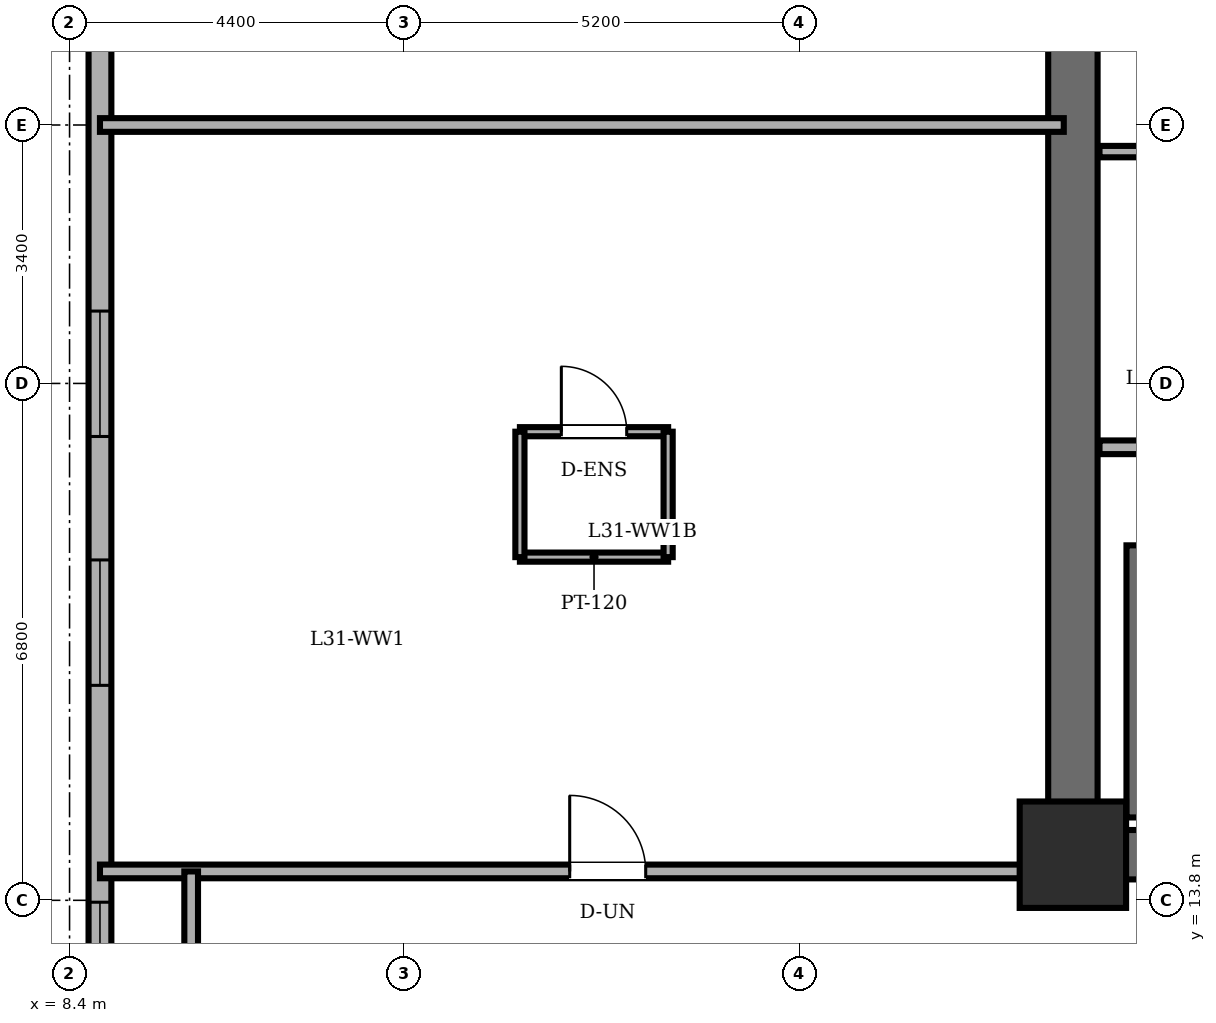
"""IFC4 building model, lengths in metres.
Left out: names, types, materials, properties, quantities, classifications, styles, units other than length and angle.
Written with IfcOpenShell. Run it as: python <this file> out.ifc"""

import sys

from ifc_helpers import new_model, si_unit, direction, frame, frame_2d, origin, origin_2d, place, context, subcontext, project, spatial, rectangle, extrude, element, fill, save


model = new_model("IFC4")
c1 = context("Model", 3, precision=1e-05, world=origin(), true_north=direction((0.0, 1.0)))
c2 = subcontext(c1, "Body", "Model", "MODEL_VIEW")
j1 = project(units=[si_unit("LENGTHUNIT", "METRE"), si_unit("PLANEANGLEUNIT", "RADIAN")], contexts=[c1])
p1 = place(None, origin())
s1 = spatial("IfcSite", under=j1, at=p1, CompositionType="ELEMENT")
p2 = place(p1, origin())
s2 = spatial("IfcBuilding", under=s1, at=p2, CompositionType="ELEMENT")
p3 = place(p2, frame((0.0, 0.0, 118.7)))
s3 = spatial("IfcBuildingStorey", under=s2, at=p3, CompositionType="ELEMENT", Elevation=118.7)
p4 = place(p3, frame((21.6, 14.4, 0.0), z_axis=(0.0, 0.0, 1.0), x_axis=(1.0, 0.0, 0.0)))
e1 = element("IfcColumn", 1, at=p4, inside=s3, PredefinedType="COLUMN", context=c2, shape_type="SweptSolid", body=[
    extrude(rectangle(XDim=1.4, YDim=1.4, at=origin_2d()), origin(), (0.0, 0.0, 1.0), 3.6),
])
p5 = place(p3, frame((8.8, 38.2, 0.0), z_axis=(0.0, 0.0, 1.0), x_axis=(0.0, -1.0, 0.0)))
e2 = element("IfcWall", 2, at=p5, inside=s3, PredefinedType="SOLIDWALL", context=c2, shape_type="SweptSolid", body=[
    extrude(rectangle(XDim=28.4, YDim=0.3, at=frame_2d((14.2, 0.0))), origin(), (0.0, 0.0, 1.0), 3.4),
])
p6 = place(p5, frame((2.325, 0.0, 0.85)))
e3 = element("IfcOpeningElement", 3, at=p6, cuts=e2, PredefinedType="OPENING", context=c2, shape_type="SweptSolid", body=[
    extrude(rectangle(XDim=1.65, YDim=1.55, at=frame_2d((0.825, 0.775))), frame((0.0, 0.16, 0.0), z_axis=(0.0, -1.0, 0.0), x_axis=(1.0, 0.0, 0.0)), (0.0, 0.0, 1.0), 0.32),
])
p7 = place(p5, frame((6.828, 0.0, 0.85)))
e4 = element("IfcOpeningElement", 4, at=p7, cuts=e2, PredefinedType="OPENING", context=c2, shape_type="SweptSolid", body=[
    extrude(rectangle(XDim=1.65, YDim=1.55, at=frame_2d((0.825, 0.775))), frame((0.0, 0.16, 0.0), z_axis=(0.0, -1.0, 0.0), x_axis=(1.0, 0.0, 0.0)), (0.0, 0.0, 1.0), 0.32),
])
p8 = place(p5, frame((10.102, 0.0, 0.85)))
e5 = element("IfcOpeningElement", 5, at=p8, cuts=e2, PredefinedType="OPENING", context=c2, shape_type="SweptSolid", body=[
    extrude(rectangle(XDim=1.65, YDim=1.55, at=frame_2d((0.825, 0.775))), frame((0.0, 0.16, 0.0), z_axis=(0.0, -1.0, 0.0), x_axis=(1.0, 0.0, 0.0)), (0.0, 0.0, 1.0), 0.32),
])
p9 = place(p5, frame((16.648, 0.0, 0.85)))
e6 = element("IfcOpeningElement", 6, at=p9, cuts=e2, PredefinedType="OPENING", context=c2, shape_type="SweptSolid", body=[
    extrude(rectangle(XDim=1.65, YDim=1.55, at=frame_2d((0.825, 0.775))), frame((0.0, 0.16, 0.0), z_axis=(0.0, -1.0, 0.0), x_axis=(1.0, 0.0, 0.0)), (0.0, 0.0, 1.0), 0.32),
])
p10 = place(p5, frame((19.922, 0.0, 0.85)))
e7 = element("IfcOpeningElement", 7, at=p10, cuts=e2, PredefinedType="OPENING", context=c2, shape_type="SweptSolid", body=[
    extrude(rectangle(XDim=1.65, YDim=1.55, at=frame_2d((0.825, 0.775))), frame((0.0, 0.16, 0.0), z_axis=(0.0, -1.0, 0.0), x_axis=(1.0, 0.0, 0.0)), (0.0, 0.0, 1.0), 0.32),
])
p11 = place(p5, frame((24.425, 0.0, 0.85)))
e8 = element("IfcOpeningElement", 8, at=p11, cuts=e2, PredefinedType="OPENING", context=c2, shape_type="SweptSolid", body=[
    extrude(rectangle(XDim=1.65, YDim=1.55, at=frame_2d((0.825, 0.775))), frame((0.0, 0.16, 0.0), z_axis=(0.0, -1.0, 0.0), x_axis=(1.0, 0.0, 0.0)), (0.0, 0.0, 1.0), 0.32),
])
p12 = place(p3, frame((21.6, 14.4, 0.0), z_axis=(0.0, 0.0, 1.0), x_axis=(0.0, 1.0, 0.0)))
e9 = element("IfcWall", 9, at=p12, inside=s3, PredefinedType="SHEAR", context=c2, shape_type="SweptSolid", body=[
    extrude(rectangle(XDim=19.2, YDim=0.65, at=frame_2d((9.6, 0.0))), origin(), (0.0, 0.0, 1.0), 3.4),
])
p13 = place(p3, frame((37.2, 14.4, 0.0), z_axis=(0.0, 0.0, 1.0), x_axis=(-1.0, 0.0, 0.0)))
e10 = element("IfcWall", 10, at=p13, inside=s3, PredefinedType="SHEAR", context=c2, shape_type="SweptSolid", body=[
    extrude(rectangle(XDim=15.6, YDim=0.65, at=frame_2d((7.8, 0.0))), origin(), (0.0, 0.0, 1.0), 3.4),
])
p14 = place(p3, frame((22.48, 14.89, 0.0), z_axis=(0.0, 0.0, 1.0), x_axis=(0.0, 1.0, 0.0)))
e11 = element("IfcWall", 11, at=p14, inside=s3, PredefinedType="SOLIDWALL", context=c2, shape_type="SweptSolid", body=[
    extrude(rectangle(XDim=3.58, YDim=0.35, at=frame_2d((1.79, 0.0))), origin(), (0.0, 0.0, 1.0), 3.4),
])
p15 = place(p3, frame((21.95, 19.76, 0.0), z_axis=(0.0, 0.0, 1.0), x_axis=(1.0, 0.0, 0.0)))
e12 = element("IfcWall", 12, at=p15, inside=s3, PredefinedType="PARTITIONING", context=c2, shape_type="SweptSolid", body=[
    extrude(rectangle(XDim=14.87, YDim=0.18, at=frame_2d((7.435, 0.0))), origin(), (0.0, 0.0, 1.0), 3.4),
])
p16 = place(p3, frame((21.95, 23.65, 0.0), z_axis=(0.0, 0.0, 1.0), x_axis=(1.0, 0.0, 0.0)))
e13 = element("IfcWall", 13, at=p16, inside=s3, PredefinedType="PARTITIONING", context=c2, shape_type="SweptSolid", body=[
    extrude(rectangle(XDim=2.51, YDim=0.15, at=frame_2d((1.255, 0.0))), origin(), (0.0, 0.0, 1.0), 3.4),
])
p17 = place(p3, frame((14.325, 19.965, 0.0), z_axis=(0.0, 0.0, 1.0), x_axis=(1.0, 0.0, 0.0)))
e14 = element("IfcWall", 14, at=p17, inside=s3, PredefinedType="PARTITIONING", context=c2, shape_type="SweptSolid", body=[
    extrude(rectangle(XDim=1.95, YDim=0.12, at=frame_2d((0.975, 0.0))), origin(), (0.0, 0.0, 1.0), 3.4),
])
p18 = place(p17, frame((0.545, 0.0, 0.0)))
e15 = element("IfcOpeningElement", 15, at=p18, cuts=e14, PredefinedType="OPENING", context=c2, shape_type="SweptSolid", body=[
    extrude(rectangle(XDim=0.86, YDim=2.1, at=frame_2d((0.43, 1.05))), frame((0.0, 0.07, 0.0), z_axis=(0.0, -1.0, 0.0), x_axis=(1.0, 0.0, 0.0)), (0.0, 0.0, 1.0), 0.14),
])
p19 = place(p3, frame((16.275, 18.315, 0.0), z_axis=(0.0, 0.0, 1.0), x_axis=(-1.0, 0.0, 0.0)))
e16 = element("IfcWall", 16, at=p19, inside=s3, PredefinedType="PARTITIONING", context=c2, shape_type="SweptSolid", body=[
    extrude(rectangle(XDim=1.95, YDim=0.12, at=frame_2d((0.975, 0.0))), origin(), (0.0, 0.0, 1.0), 3.4),
])
for number, where, z_axis, x_axis in (
    (17, (14.325, 19.965, 0.0), (0.0, 0.0, 1.0), (0.0, -1.0, 0.0)),
    (18, (16.275, 18.315, 0.0), (0.0, 0.0, 1.0), (0.0, 1.0, 0.0)),
):
    element("IfcWall", number, at=place(p3, frame(where, z_axis=z_axis, x_axis=x_axis)), inside=s3, PredefinedType="PARTITIONING", context=c2, shape_type="SweptSolid", body=[
        extrude(rectangle(XDim=1.65, YDim=0.12, at=frame_2d((0.825, 0.0))), origin(), (0.0, 0.0, 1.0), 3.4),
    ])
p20 = place(p3, frame((8.8, 14.18, 0.0), z_axis=(0.0, 0.0, 1.0), x_axis=(1.0, 0.0, 0.0)))
e19 = element("IfcWall", 19, at=p20, inside=s3, PredefinedType="PARTITIONING", context=c2, shape_type="SweptSolid", body=[
    extrude(rectangle(XDim=12.68, YDim=0.18, at=frame_2d((6.34, 0.0))), origin(), (0.0, 0.0, 1.0), 3.4),
])
p21 = place(p20, frame((6.18, 0.0, 0.0)))
e20 = element("IfcOpeningElement", 20, at=p21, cuts=e19, PredefinedType="OPENING", context=c2, shape_type="SweptSolid", body=[
    extrude(rectangle(XDim=1.0, YDim=2.15, at=frame_2d((0.5, 1.075))), frame((0.0, 0.1, 0.0), z_axis=(0.0, -1.0, 0.0), x_axis=(1.0, 0.0, 0.0)), (0.0, 0.0, 1.0), 0.2),
])
p22 = place(p3, frame((8.8, 24.0, 0.0), z_axis=(0.0, 0.0, 1.0), x_axis=(1.0, 0.0, 0.0)))
e21 = element("IfcWall", 21, at=p22, inside=s3, PredefinedType="PARTITIONING", context=c2, shape_type="SweptSolid", body=[
    extrude(rectangle(XDim=12.68, YDim=0.18, at=frame_2d((6.34, 0.0))), origin(), (0.0, 0.0, 1.0), 3.4),
])
p23 = place(p3, frame((10.0, 11.72, 0.0), z_axis=(0.0, 0.0, 1.0), x_axis=(0.0, 1.0, 0.0)))
e22 = element("IfcWall", 22, at=p23, inside=s3, PredefinedType="PARTITIONING", context=c2, shape_type="SweptSolid", body=[
    extrude(rectangle(XDim=2.46, YDim=0.18, at=frame_2d((1.23, 0.0))), origin(), (0.0, 0.0, 1.0), 3.4),
])
p24 = place(p9, origin())
e23 = element("IfcWindow", 23, at=p24, inside=s3, PartitioningType="DOUBLE_PANEL_VERTICAL", PredefinedType="WINDOW", context=c2, shape_type="SweptSolid", body=[
    extrude(rectangle(XDim=1.65, YDim=1.55, at=frame_2d((0.825, 0.775))), frame((0.0, 0.03, 0.0), z_axis=(0.0, -1.0, 0.0), x_axis=(1.0, 0.0, 0.0)), (0.0, 0.0, 1.0), 0.06),
])
fill(e6, e23)
p25 = place(p10, origin())
e24 = element("IfcWindow", 24, at=p25, inside=s3, PartitioningType="DOUBLE_PANEL_VERTICAL", PredefinedType="WINDOW", context=c2, shape_type="SweptSolid", body=[
    extrude(rectangle(XDim=1.65, YDim=1.55, at=frame_2d((0.825, 0.775))), frame((0.0, 0.03, 0.0), z_axis=(0.0, -1.0, 0.0), x_axis=(1.0, 0.0, 0.0)), (0.0, 0.0, 1.0), 0.06),
])
fill(e7, e24)
p26 = place(p11, origin())
e25 = element("IfcWindow", 25, at=p26, inside=s3, PartitioningType="DOUBLE_PANEL_VERTICAL", PredefinedType="WINDOW", context=c2, shape_type="SweptSolid", body=[
    extrude(rectangle(XDim=1.65, YDim=1.55, at=frame_2d((0.825, 0.775))), frame((0.0, 0.03, 0.0), z_axis=(0.0, -1.0, 0.0), x_axis=(1.0, 0.0, 0.0)), (0.0, 0.0, 1.0), 0.06),
])
fill(e8, e25)
p27 = place(p18, origin())
e26 = element("IfcDoor", 26, at=p27, inside=s3, OperationType="SINGLE_SWING_LEFT", PredefinedType="DOOR", context=c2, shape_type="SweptSolid", body=[
    extrude(rectangle(XDim=0.86, YDim=2.1, at=frame_2d((0.43, 1.05))), frame((0.0, 0.025, 0.0), z_axis=(0.0, -1.0, 0.0), x_axis=(1.0, 0.0, 0.0)), (0.0, 0.0, 1.0), 0.05),
])
fill(e15, e26)
p28 = place(p21, origin())
e27 = element("IfcDoor", 27, at=p28, inside=s3, OperationType="SINGLE_SWING_LEFT", PredefinedType="DOOR", context=c2, shape_type="SweptSolid", body=[
    extrude(rectangle(XDim=1.0, YDim=2.15, at=frame_2d((0.5, 1.075))), frame((0.0, 0.025, 0.0), z_axis=(0.0, -1.0, 0.0), x_axis=(1.0, 0.0, 0.0)), (0.0, 0.0, 1.0), 0.05),
])
fill(e20, e27)
save(model, sys.argv[1])
